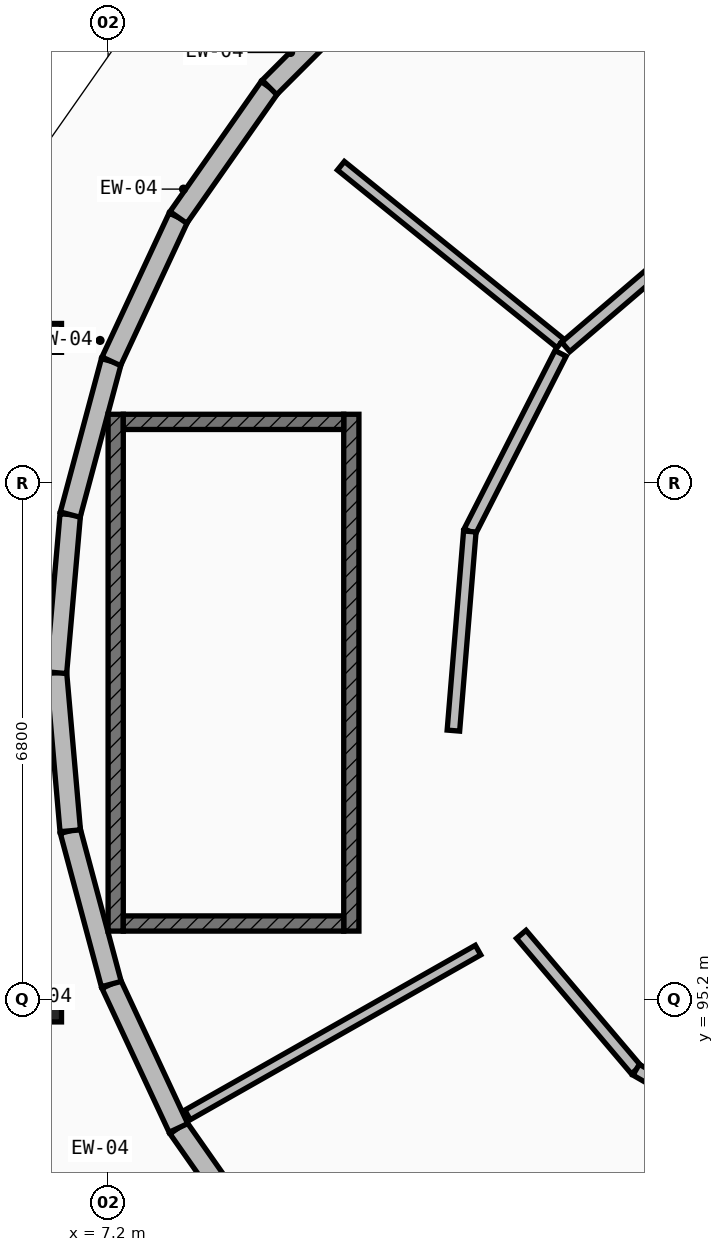
"""IFC4 building model, lengths in metres.
Left out: names, types, materials, properties, quantities, classifications, styles, units other than length and angle.
Written with IfcOpenShell. Run it as: python <this file> out.ifc"""

import sys

from ifc_helpers import new_model, si_unit, direction, frame, frame_2d, origin, origin_2d, place, context, subcontext, project, spatial, rectangle, circle, extrude, element, fill, save


model = new_model("IFC4")
c1 = context("Model", 3, precision=1e-05, world=origin(), true_north=direction((0.0, 1.0)))
c2 = subcontext(c1, "Body", "Model", "MODEL_VIEW")
j1 = project(units=[si_unit("LENGTHUNIT", "METRE"), si_unit("PLANEANGLEUNIT", "RADIAN")], contexts=[c1])
p1 = place(None, origin())
s1 = spatial("IfcSite", under=j1, at=p1, CompositionType="ELEMENT")
p2 = place(p1, origin())
s2 = spatial("IfcBuilding", under=s1, at=p2, CompositionType="ELEMENT")
p3 = place(p2, frame((0.0, 0.0, 21.35)))
s3 = spatial("IfcBuildingStorey", under=s2, at=p3, CompositionType="ELEMENT", Elevation=21.35)
for number, where, z_axis, x_axis in (
    (1, (8.633, 107.779, 0.0), (0.0, 0.0, 1.0), (1.0, 0.0, 0.0)),
    (2, (6.397, 103.905, 0.0), (0.0, 0.0, 1.0), (1.0, 0.0, 0.0)),
    (3, (6.397, 95.095, 0.0), (0.0, 0.0, 1.0), (1.0, 0.0, 0.0)),
):
    element("IfcColumn", number, at=place(p3, frame(where, z_axis=z_axis, x_axis=x_axis)), inside=s3, PredefinedType="PILASTER", context=c2, shape_type="SweptSolid", body=[
        extrude(circle(Radius=0.19, at=origin_2d()), origin(), (0.0, 0.0, 1.0), 4.2),
    ])
p4 = place(p3, frame((9.323, 91.799, 0.0), z_axis=(0.0, 0.0, 1.0), x_axis=(-0.573572167388, 0.819155033433, 0.0)))
e4 = element("IfcWall", 4, at=p4, inside=s3, PredefinedType="ELEMENTEDWALL", context=c2, shape_type="SweptSolid", body=[
    extrude(rectangle(XDim=2.089, YDim=0.27, at=frame_2d((1.044, 0.0))), origin(), (0.0, 0.0, 1.0), 3.314),
])
p5 = place(p4, frame((0.584, 0.0, 0.85)))
e5 = element("IfcOpeningElement", 5, at=p5, cuts=e4, PredefinedType="OPENING", context=c2, shape_type="SweptSolid", body=[
    extrude(rectangle(XDim=0.92, YDim=1.55, at=frame_2d((0.46, 0.775))), frame((0.0, 0.145, 0.0), z_axis=(0.0, -1.0, 0.0), x_axis=(1.0, 0.0, 0.0)), (0.0, 0.0, 1.0), 0.29),
])
p6 = place(p3, frame((8.125, 93.51, 0.0), z_axis=(0.0, 0.0, 1.0), x_axis=(-0.422738299131, 0.906251803004, 0.0)))
e6 = element("IfcWall", 6, at=p6, inside=s3, PredefinedType="ELEMENTEDWALL", context=c2, shape_type="SweptSolid", body=[
    extrude(rectangle(XDim=2.089, YDim=0.27, at=frame_2d((1.044, 0.0))), origin(), (0.0, 0.0, 1.0), 3.314),
])
p7 = place(p6, frame((0.569, 0.0, 0.85)))
e7 = element("IfcOpeningElement", 7, at=p7, cuts=e6, PredefinedType="OPENING", context=c2, shape_type="SweptSolid", body=[
    extrude(rectangle(XDim=0.95, YDim=1.35, at=frame_2d((0.475, 0.675))), frame((0.0, 0.145, 0.0), z_axis=(0.0, -1.0, 0.0), x_axis=(1.0, 0.0, 0.0)), (0.0, 0.0, 1.0), 0.29),
])
p8 = place(p3, frame((7.242, 95.403, 0.0), z_axis=(0.0, 0.0, 1.0), x_axis=(-0.258652308331, 0.965970487849, 0.0)))
e8 = element("IfcWall", 8, at=p8, inside=s3, PredefinedType="ELEMENTEDWALL", context=c2, shape_type="SweptSolid", body=[
    extrude(rectangle(XDim=2.088, YDim=0.27, at=frame_2d((1.044, 0.0))), origin(), (0.0, 0.0, 1.0), 3.314),
])
p9 = place(p8, frame((0.569, 0.0, 0.85)))
e9 = element("IfcOpeningElement", 9, at=p9, cuts=e8, PredefinedType="OPENING", context=c2, shape_type="SweptSolid", body=[
    extrude(rectangle(XDim=0.95, YDim=1.6, at=frame_2d((0.475, 0.8))), frame((0.0, 0.145, 0.0), z_axis=(0.0, -1.0, 0.0), x_axis=(1.0, 0.0, 0.0)), (0.0, 0.0, 1.0), 0.29),
])
for number, where, z_axis, x_axis in (
    (10, (6.702, 97.42, 0.0), (0.0, 0.0, 1.0), (-0.087, 0.996, 0.0)),
    (11, (6.52, 99.5, 0.0), (0.0, 0.0, 1.0), (0.087, 0.996, 0.0)),
):
    element("IfcWall", number, at=place(p3, frame(where, z_axis=z_axis, x_axis=x_axis)), inside=s3, PredefinedType="ELEMENTEDWALL", context=c2, shape_type="SweptSolid", body=[
        extrude(rectangle(XDim=2.088, YDim=0.27, at=frame_2d((1.044, 0.0))), origin(), (0.0, 0.0, 1.0), 3.314),
    ])
p10 = place(p3, frame((6.702, 101.58, 0.0), z_axis=(0.0, 0.0, 1.0), x_axis=(0.258652308331, 0.965970487849, 0.0)))
e12 = element("IfcWall", 12, at=p10, inside=s3, PredefinedType="ELEMENTEDWALL", context=c2, shape_type="SweptSolid", body=[
    extrude(rectangle(XDim=2.088, YDim=0.27, at=frame_2d((1.044, 0.0))), origin(), (0.0, 0.0, 1.0), 3.314),
])
p11 = place(p10, frame((0.569, 0.0, 0.85)))
e13 = element("IfcOpeningElement", 13, at=p11, cuts=e12, PredefinedType="OPENING", context=c2, shape_type="SweptSolid", body=[
    extrude(rectangle(XDim=0.95, YDim=1.8, at=frame_2d((0.475, 0.9))), frame((0.0, 0.145, 0.0), z_axis=(0.0, -1.0, 0.0), x_axis=(1.0, 0.0, 0.0)), (0.0, 0.0, 1.0), 0.29),
])
p12 = place(p3, frame((7.242, 103.597, 0.0), z_axis=(0.0, 0.0, 1.0), x_axis=(0.422738299131, 0.906251803004, 0.0)))
e14 = element("IfcWall", 14, at=p12, inside=s3, PredefinedType="ELEMENTEDWALL", context=c2, shape_type="SweptSolid", body=[
    extrude(rectangle(XDim=2.089, YDim=0.27, at=frame_2d((1.044, 0.0))), origin(), (0.0, 0.0, 1.0), 3.314),
])
p13 = place(p12, frame((0.569, 0.0, 0.85)))
e15 = element("IfcOpeningElement", 15, at=p13, cuts=e14, PredefinedType="OPENING", context=c2, shape_type="SweptSolid", body=[
    extrude(rectangle(XDim=0.95, YDim=2.05, at=frame_2d((0.475, 1.025))), frame((0.0, 0.145, 0.0), z_axis=(0.0, -1.0, 0.0), x_axis=(1.0, 0.0, 0.0)), (0.0, 0.0, 1.0), 0.29),
])
p14 = place(p3, frame((8.125, 105.49, 0.0), z_axis=(0.0, 0.0, 1.0), x_axis=(0.573572167388, 0.819155033433, 0.0)))
e16 = element("IfcWall", 16, at=p14, inside=s3, PredefinedType="ELEMENTEDWALL", context=c2, shape_type="SweptSolid", body=[
    extrude(rectangle(XDim=2.089, YDim=0.27, at=frame_2d((1.044, 0.0))), origin(), (0.0, 0.0, 1.0), 3.314),
])
p15 = place(p14, frame((0.519, 0.0, 0.0)))
e17 = element("IfcOpeningElement", 17, at=p15, cuts=e16, PredefinedType="OPENING", context=c2, shape_type="SweptSolid", body=[
    extrude(rectangle(XDim=1.05, YDim=2.15, at=frame_2d((0.525, 1.075))), frame((0.0, 0.145, 0.0), z_axis=(0.0, -1.0, 0.0), x_axis=(1.0, 0.0, 0.0)), (0.0, 0.0, 1.0), 0.29),
])
p16 = place(p3, frame((9.323, 107.201, 0.0), z_axis=(0.0, 0.0, 1.0), x_axis=(0.707106781187, 0.707106781187, 0.0)))
e18 = element("IfcWall", 18, at=p16, inside=s3, PredefinedType="ELEMENTEDWALL", context=c2, shape_type="SweptSolid", body=[
    extrude(rectangle(XDim=2.087, YDim=0.27, at=frame_2d((1.044, 0.0))), origin(), (0.0, 0.0, 1.0), 3.314),
])
p17 = place(p16, frame((0.554, 0.0, 0.85)))
e19 = element("IfcOpeningElement", 19, at=p17, cuts=e18, PredefinedType="OPENING", context=c2, shape_type="SweptSolid", body=[
    extrude(rectangle(XDim=0.98, YDim=1.5, at=frame_2d((0.49, 0.75))), frame((0.0, 0.145, 0.0), z_axis=(0.0, -1.0, 0.0), x_axis=(1.0, 0.0, 0.0)), (0.0, 0.0, 1.0), 0.29),
])
p18 = place(p3, frame((10.4, 96.1, 0.0), z_axis=(0.0, 0.0, 1.0), x_axis=(0.0, 1.0, 0.0)))
e20 = element("IfcWall", 20, at=p18, inside=s3, PredefinedType="SHEAR", context=c2, shape_type="SweptSolid", body=[
    extrude(rectangle(XDim=6.8, YDim=0.2, at=frame_2d((3.4, 0.0))), origin(), (0.0, 0.0, 1.0), 3.96),
])
p19 = place(p18, frame((0.38, 0.0, 0.0)))
e21 = element("IfcOpeningElement", 21, at=p19, cuts=e20, PredefinedType="OPENING", context=c2, shape_type="SweptSolid", body=[
    extrude(rectangle(XDim=1.1, YDim=2.15, at=frame_2d((0.55, 1.075))), frame((0.0, 0.11, 0.0), z_axis=(0.0, -1.0, 0.0), x_axis=(1.0, 0.0, 0.0)), (0.0, 0.0, 1.0), 0.22),
])
p20 = place(p3, frame((7.3, 96.1, 0.0), z_axis=(0.0, 0.0, 1.0), x_axis=(0.0, 1.0, 0.0)))
e22 = element("IfcWall", 22, at=p20, inside=s3, PredefinedType="SHEAR", context=c2, shape_type="SweptSolid", body=[
    extrude(rectangle(XDim=6.8, YDim=0.2, at=frame_2d((3.4, 0.0))), origin(), (0.0, 0.0, 1.0), 3.96),
])
for number, where, z_axis, x_axis in (
    (23, (10.3, 96.2, 0.0), (0.0, 0.0, 1.0), (-1.0, 0.0, 0.0)),
    (24, (10.3, 102.8, 0.0), (0.0, 0.0, 1.0), (-1.0, 0.0, 0.0)),
):
    element("IfcWall", number, at=place(p3, frame(where, z_axis=z_axis, x_axis=x_axis)), inside=s3, PredefinedType="SHEAR", context=c2, shape_type="SweptSolid", body=[
        extrude(rectangle(XDim=2.9, YDim=0.2, at=frame_2d((1.45, 0.0))), origin(), (0.0, 0.0, 1.0), 3.96),
    ])
p21 = place(p3, frame((13.151, 103.832, 0.0), z_axis=(0.0, 0.0, 1.0), x_axis=(-0.777240280244, 0.629203899198, 0.0)))
e25 = element("IfcWall", 25, at=p21, inside=s3, PredefinedType="PARTITIONING", context=c2, shape_type="SweptSolid", body=[
    extrude(rectangle(XDim=3.716, YDim=0.145, at=frame_2d((1.858, 0.0))), origin(), (0.0, 0.0, 1.0), 3.279),
])
p22 = place(p3, frame((12.067, 95.85, 0.0), z_axis=(0.0, 0.0, 1.0), x_axis=(-0.869678824808, -0.493618011909, 0.0)))
e26 = element("IfcWall", 26, at=p22, inside=s3, PredefinedType="PARTITIONING", context=c2, shape_type="SweptSolid", body=[
    extrude(rectangle(XDim=4.395, YDim=0.145, at=frame_2d((2.197, 0.0))), origin(), (0.0, 0.0, 1.0), 3.279),
])
p23 = place(p3, frame((13.153, 103.701, 0.0), z_axis=(0.0, 0.0, 1.0), x_axis=(-0.454070411611, -0.890965802542, 0.0)))
e27 = element("IfcWall", 27, at=p23, inside=s3, PredefinedType="PARTITIONING", context=c2, shape_type="SweptSolid", body=[
    extrude(rectangle(XDim=2.63, YDim=0.165, at=frame_2d((1.315, 0.0))), origin(), (0.0, 0.0, 1.0), 3.279),
])
p24 = place(p23, frame((0.854, 0.0, 0.0)))
e28 = element("IfcOpeningElement", 28, at=p24, cuts=e27, PredefinedType="OPENING", context=c2, shape_type="SweptSolid", body=[
    extrude(rectangle(XDim=0.92, YDim=2.24, at=frame_2d((0.46, 1.12))), frame((0.0, 0.093, 0.0), z_axis=(0.0, -1.0, 0.0), x_axis=(1.0, 0.0, 0.0)), (0.0, 0.0, 1.0), 0.185),
])
p25 = place(p3, frame((11.959, 101.358, 0.0), z_axis=(0.0, 0.0, 1.0), x_axis=(-0.082192301973, -0.996616488674, 0.0)))
e29 = element("IfcWall", 29, at=p25, inside=s3, PredefinedType="PARTITIONING", context=c2, shape_type="SweptSolid", body=[
    extrude(rectangle(XDim=2.629, YDim=0.165, at=frame_2d((1.314, 0.0))), origin(), (0.0, 0.0, 1.0), 3.279),
])
p26 = place(p3, frame((12.636, 96.057, 0.0), z_axis=(0.0, 0.0, 1.0), x_axis=(0.646935088341, -0.762545075044, 0.0)))
e30 = element("IfcWall", 30, at=p26, inside=s3, PredefinedType="PARTITIONING", context=c2, shape_type="SweptSolid", body=[
    extrude(rectangle(XDim=2.336, YDim=0.165, at=frame_2d((1.168, 0.0))), origin(), (0.0, 0.0, 1.0), 3.279),
])
p27 = place(p26, frame((0.678, 0.0, 0.0)))
e31 = element("IfcOpeningElement", 31, at=p27, cuts=e30, PredefinedType="OPENING", context=c2, shape_type="SweptSolid", body=[
    extrude(rectangle(XDim=0.98, YDim=2.24, at=frame_2d((0.49, 1.12))), frame((0.0, 0.093, 0.0), z_axis=(0.0, -1.0, 0.0), x_axis=(1.0, 0.0, 0.0)), (0.0, 0.0, 1.0), 0.185),
])
p28 = place(p3, frame((14.147, 94.276, 0.0), z_axis=(0.0, 0.0, 1.0), x_axis=(0.866913733882, -0.498458200862, 0.0)))
e32 = element("IfcWall", 32, at=p28, inside=s3, PredefinedType="PARTITIONING", context=c2, shape_type="SweptSolid", body=[
    extrude(rectangle(XDim=1.065, YDim=0.165, at=frame_2d((0.532, 0.0))), origin(), (0.0, 0.0, 1.0), 3.279),
])
p29 = place(p3, frame((14.993, 105.303, 0.0), z_axis=(0.0, 0.0, 1.0), x_axis=(-0.759884425371, -0.650058197455, 0.0)))
e33 = element("IfcWall", 33, at=p29, inside=s3, PredefinedType="PARTITIONING", context=c2, shape_type="SweptSolid", body=[
    extrude(rectangle(XDim=2.332, YDim=0.165, at=frame_2d((1.166, 0.0))), origin(), (0.0, 0.0, 1.0), 3.279),
])
p30 = place(p29, frame((0.676, 0.0, 0.0)))
e34 = element("IfcOpeningElement", 34, at=p30, cuts=e33, PredefinedType="OPENING", context=c2, shape_type="SweptSolid", body=[
    extrude(rectangle(XDim=0.98, YDim=2.1, at=frame_2d((0.49, 1.05))), frame((0.0, 0.093, 0.0), z_axis=(0.0, -1.0, 0.0), x_axis=(1.0, 0.0, 0.0)), (0.0, 0.0, 1.0), 0.185),
])
p31 = place(p5, origin())
e35 = element("IfcWindow", 35, at=p31, inside=s3, PartitioningType="SINGLE_PANEL", PredefinedType="WINDOW", context=c2, shape_type="SweptSolid", body=[
    extrude(rectangle(XDim=0.92, YDim=1.55, at=frame_2d((0.46, 0.775))), frame((0.0, 0.03, 0.0), z_axis=(0.0, -1.0, 0.0), x_axis=(1.0, 0.0, 0.0)), (0.0, 0.0, 1.0), 0.06),
])
fill(e5, e35)
p32 = place(p7, origin())
e36 = element("IfcWindow", 36, at=p32, inside=s3, PartitioningType="SINGLE_PANEL", PredefinedType="WINDOW", context=c2, shape_type="SweptSolid", body=[
    extrude(rectangle(XDim=0.95, YDim=1.35, at=frame_2d((0.475, 0.675))), frame((0.0, 0.03, 0.0), z_axis=(0.0, -1.0, 0.0), x_axis=(1.0, 0.0, 0.0)), (0.0, 0.0, 1.0), 0.06),
])
fill(e7, e36)
p33 = place(p9, origin())
e37 = element("IfcWindow", 37, at=p33, inside=s3, PartitioningType="SINGLE_PANEL", PredefinedType="WINDOW", context=c2, shape_type="SweptSolid", body=[
    extrude(rectangle(XDim=0.95, YDim=1.6, at=frame_2d((0.475, 0.8))), frame((0.0, 0.03, 0.0), z_axis=(0.0, -1.0, 0.0), x_axis=(1.0, 0.0, 0.0)), (0.0, 0.0, 1.0), 0.06),
])
fill(e9, e37)
p34 = place(p11, origin())
e38 = element("IfcWindow", 38, at=p34, inside=s3, PartitioningType="SINGLE_PANEL", PredefinedType="WINDOW", context=c2, shape_type="SweptSolid", body=[
    extrude(rectangle(XDim=0.95, YDim=1.8, at=frame_2d((0.475, 0.9))), frame((0.0, 0.03, 0.0), z_axis=(0.0, -1.0, 0.0), x_axis=(1.0, 0.0, 0.0)), (0.0, 0.0, 1.0), 0.06),
])
fill(e13, e38)
p35 = place(p13, origin())
e39 = element("IfcWindow", 39, at=p35, inside=s3, PartitioningType="SINGLE_PANEL", PredefinedType="WINDOW", context=c2, shape_type="SweptSolid", body=[
    extrude(rectangle(XDim=0.95, YDim=2.05, at=frame_2d((0.475, 1.025))), frame((0.0, 0.03, 0.0), z_axis=(0.0, -1.0, 0.0), x_axis=(1.0, 0.0, 0.0)), (0.0, 0.0, 1.0), 0.06),
])
fill(e15, e39)
p36 = place(p15, origin())
e40 = element("IfcDoor", 40, at=p36, inside=s3, OperationType="SINGLE_SWING_LEFT", PredefinedType="DOOR", context=c2, shape_type="SweptSolid", body=[
    extrude(rectangle(XDim=1.05, YDim=2.15, at=frame_2d((0.525, 1.075))), frame((0.0, 0.025, 0.0), z_axis=(0.0, -1.0, 0.0), x_axis=(1.0, 0.0, 0.0)), (0.0, 0.0, 1.0), 0.05),
])
fill(e17, e40)
p37 = place(p17, origin())
e41 = element("IfcWindow", 41, at=p37, inside=s3, PartitioningType="SINGLE_PANEL", PredefinedType="WINDOW", context=c2, shape_type="SweptSolid", body=[
    extrude(rectangle(XDim=0.98, YDim=1.5, at=frame_2d((0.49, 0.75))), frame((0.0, 0.03, 0.0), z_axis=(0.0, -1.0, 0.0), x_axis=(1.0, 0.0, 0.0)), (0.0, 0.0, 1.0), 0.06),
])
fill(e19, e41)
p38 = place(p19, origin())
e42 = element("IfcDoor", 42, at=p38, inside=s3, OperationType="SINGLE_SWING_RIGHT", PredefinedType="DOOR", context=c2, shape_type="SweptSolid", body=[
    extrude(rectangle(XDim=1.1, YDim=2.15, at=frame_2d((0.55, 1.075))), frame((0.0, 0.025, 0.0), z_axis=(0.0, -1.0, 0.0), x_axis=(1.0, 0.0, 0.0)), (0.0, 0.0, 1.0), 0.05),
])
fill(e21, e42)
p39 = place(p24, origin())
e43 = element("IfcDoor", 43, at=p39, inside=s3, OperationType="SINGLE_SWING_LEFT", PredefinedType="DOOR", context=c2, shape_type="SweptSolid", body=[
    extrude(rectangle(XDim=0.92, YDim=2.24, at=frame_2d((0.46, 1.12))), frame((0.0, 0.025, 0.0), z_axis=(0.0, -1.0, 0.0), x_axis=(1.0, 0.0, 0.0)), (0.0, 0.0, 1.0), 0.05),
])
fill(e28, e43)
p40 = place(p27, origin())
e44 = element("IfcDoor", 44, at=p40, inside=s3, OperationType="SINGLE_SWING_RIGHT", PredefinedType="DOOR", context=c2, shape_type="SweptSolid", body=[
    extrude(rectangle(XDim=0.98, YDim=2.24, at=frame_2d((0.49, 1.12))), frame((0.0, 0.025, 0.0), z_axis=(0.0, -1.0, 0.0), x_axis=(1.0, 0.0, 0.0)), (0.0, 0.0, 1.0), 0.05),
])
fill(e31, e44)
p41 = place(p30, origin())
e45 = element("IfcDoor", 45, at=p41, inside=s3, OperationType="SINGLE_SWING_RIGHT", PredefinedType="DOOR", context=c2, shape_type="SweptSolid", body=[
    extrude(rectangle(XDim=0.98, YDim=2.1, at=frame_2d((0.49, 1.05))), frame((0.0, 0.025, 0.0), z_axis=(0.0, -1.0, 0.0), x_axis=(1.0, 0.0, 0.0)), (0.0, 0.0, 1.0), 0.05),
])
fill(e34, e45)
save(model, sys.argv[1])
